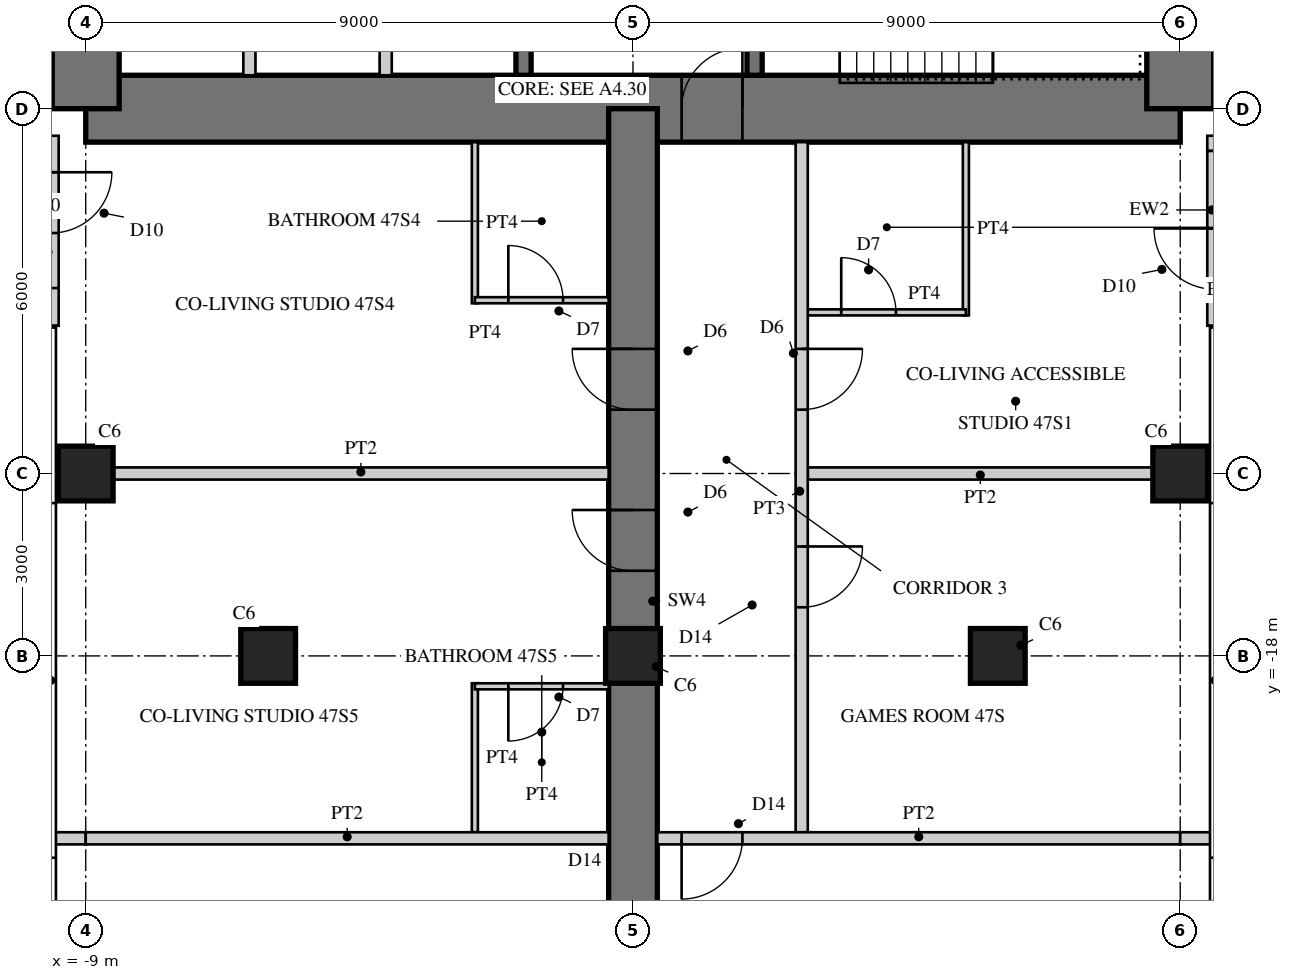
"""IFC4 building model, lengths in metres.
Left out: names, types, materials, properties, quantities, classifications, styles, units other than length and angle.
Written with IfcOpenShell. Run it as: python <this file> out.ifc"""

import sys

from ifc_helpers import new_model, si_unit, direction, frame, frame_2d, origin, origin_2d, place, context, subcontext, project, spatial, rectangle, hollow_rectangle, extrude, element, fill, save


model = new_model("IFC4")
c1 = context("Model", 3, precision=1e-05, world=origin(), true_north=direction((0.0, 1.0)))
c2 = subcontext(c1, "Body", "Model", "MODEL_VIEW")
j1 = project(units=[si_unit("LENGTHUNIT", "METRE"), si_unit("PLANEANGLEUNIT", "RADIAN")], contexts=[c1])
p1 = place(None, origin())
s1 = spatial("IfcSite", under=j1, at=p1, CompositionType="ELEMENT")
p2 = place(p1, origin())
s2 = spatial("IfcBuilding", under=s1, at=p2, CompositionType="ELEMENT")
p3 = place(p2, frame((0.0, 0.0, 189.9)))
s3 = spatial("IfcBuildingStorey", under=s2, at=p3, CompositionType="ELEMENT", Elevation=189.9)
p4 = place(p3, frame((-9.0, -9.0, 0.0), z_axis=(0.0, 0.0, 1.0), x_axis=(1.0, 0.0, 0.0)))
e1 = element("IfcWall", 1, at=p4, inside=s3, PredefinedType="SHEAR", context=c2, shape_type="SweptSolid", body=[
    extrude(rectangle(XDim=18.0, YDim=1.1, at=frame_2d((9.0, 0.0))), origin(), (0.0, 0.0, 1.0), 3.4),
])
p5 = place(p4, frame((9.8, 0.0, 0.0)))
e2 = element("IfcOpeningElement", 2, at=p5, cuts=e1, PredefinedType="OPENING", context=c2, shape_type="SweptSolid", body=[
    extrude(rectangle(XDim=1.0, YDim=2.4, at=frame_2d((0.5, 1.2))), frame((0.0, 0.56, 0.0), z_axis=(0.0, -1.0, 0.0), x_axis=(1.0, 0.0, 0.0)), (0.0, 0.0, 1.0), 1.12),
])
p6 = place(p3, frame((9.0, -9.0, 0.0), z_axis=(0.0, 0.0, 1.0), x_axis=(0.0, 1.0, 0.0)))
e3 = element("IfcWall", 3, at=p6, inside=s3, PredefinedType="SHEAR", context=c2, shape_type="SweptSolid", body=[
    extrude(rectangle(XDim=18.0, YDim=1.1, at=frame_2d((9.0, 0.0))), origin(), (0.0, 0.0, 1.0), 3.4),
])
p7 = place(p6, frame((9.8, 0.0, 0.0)))
e4 = element("IfcOpeningElement", 4, at=p7, cuts=e3, PredefinedType="OPENING", context=c2, shape_type="SweptSolid", body=[
    extrude(rectangle(XDim=1.0, YDim=2.4, at=frame_2d((0.5, 1.2))), frame((0.0, 0.56, 0.0), z_axis=(0.0, -1.0, 0.0), x_axis=(1.0, 0.0, 0.0)), (0.0, 0.0, 1.0), 1.12),
])
p8 = place(p3, frame((-9.0, 9.0, 0.0), z_axis=(0.0, 0.0, 1.0), x_axis=(0.0, -1.0, 0.0)))
e5 = element("IfcWall", 5, at=p8, inside=s3, PredefinedType="SHEAR", context=c2, shape_type="SweptSolid", body=[
    extrude(rectangle(XDim=18.0, YDim=1.1, at=frame_2d((9.0, 0.0))), origin(), (0.0, 0.0, 1.0), 3.4),
])
p9 = place(p8, frame((9.8, 0.0, 0.0)))
e6 = element("IfcOpeningElement", 6, at=p9, cuts=e5, PredefinedType="OPENING", context=c2, shape_type="SweptSolid", body=[
    extrude(rectangle(XDim=1.0, YDim=2.4, at=frame_2d((0.5, 1.2))), frame((0.0, 0.56, 0.0), z_axis=(0.0, -1.0, 0.0), x_axis=(1.0, 0.0, 0.0)), (0.0, 0.0, 1.0), 1.12),
])
p10 = place(p3, frame((-1.8, -1.875, 0.0), z_axis=(0.0, 0.0, 1.0), x_axis=(0.0, -1.0, 0.0)))
e7 = element("IfcWall", 7, at=p10, inside=s3, PredefinedType="SHEAR", context=c2, shape_type="SweptSolid", body=[
    extrude(rectangle(XDim=6.575, YDim=0.25, at=frame_2d((3.288, 0.0))), origin(), (0.0, 0.0, 1.0), 3.4),
])
p11 = place(p10, frame((1.875, 0.0, 0.0)))
e8 = element("IfcOpeningElement", 8, at=p11, cuts=e7, PredefinedType="OPENING", context=c2, shape_type="SweptSolid", body=[
    extrude(rectangle(XDim=1.6, YDim=2.4, at=frame_2d((0.8, 1.2))), frame((0.0, 0.135, 0.0), z_axis=(0.0, -1.0, 0.0), x_axis=(1.0, 0.0, 0.0)), (0.0, 0.0, 1.0), 0.27),
])
for number, where, z_axis, x_axis in (
    (9, (-4.067, -5.975, 0.0), (0.0, 0.0, 1.0), (0.0, -1.0, 0.0)),
    (10, (-6.308, -5.975, 0.0), (0.0, 0.0, 1.0), (0.0, -1.0, 0.0)),
):
    element("IfcWall", number, at=place(p3, frame(where, z_axis=z_axis, x_axis=x_axis)), inside=s3, PredefinedType="PARTITIONING", context=c2, shape_type="SweptSolid", body=[
        extrude(rectangle(XDim=2.475, YDim=0.2, at=frame_2d((1.237, 0.0))), origin(), (0.0, 0.0, 1.0), 3.4),
    ])
p12 = place(p3, frame((2.0, -1.675, 0.0), z_axis=(0.0, 0.0, 1.0), x_axis=(0.0, -1.0, 0.0)))
e11 = element("IfcWall", 11, at=p12, inside=s3, PredefinedType="SHEAR", context=c2, shape_type="SweptSolid", body=[
    extrude(rectangle(XDim=6.775, YDim=0.25, at=frame_2d((3.387, 0.0))), origin(), (0.0, 0.0, 1.0), 3.4),
])
p13 = place(p12, frame((0.725, 0.0, 0.0)))
e12 = element("IfcOpeningElement", 12, at=p13, cuts=e11, PredefinedType="OPENING", context=c2, shape_type="SweptSolid", body=[
    extrude(rectangle(XDim=1.0, YDim=2.1, at=frame_2d((0.5, 1.05))), frame((0.0, 0.135, 0.0), z_axis=(0.0, -1.0, 0.0), x_axis=(1.0, 0.0, 0.0)), (0.0, 0.0, 1.0), 0.27),
])
p14 = place(p3, frame((0.0, -9.0, 0.0), z_axis=(0.0, 0.0, 1.0), x_axis=(0.0, -1.0, 0.0)))
e13 = element("IfcWall", 13, at=p14, inside=s3, PredefinedType="SHEAR", context=c2, shape_type="SweptSolid", body=[
    extrude(rectangle(XDim=18.0, YDim=0.8, at=frame_2d((9.0, 0.0))), origin(), (0.0, 0.0, 1.0), 3.4),
])
p15 = place(p14, frame((3.95, 0.0, 0.0)))
e14 = element("IfcOpeningElement", 14, at=p15, cuts=e13, PredefinedType="OPENING", context=c2, shape_type="SweptSolid", body=[
    extrude(rectangle(XDim=1.0, YDim=2.15, at=frame_2d((0.5, 1.075))), frame((0.0, 0.41, 0.0), z_axis=(0.0, -1.0, 0.0), x_axis=(1.0, 0.0, 0.0)), (0.0, 0.0, 1.0), 0.82),
])
p16 = place(p14, frame((6.6, 0.0, 0.0)))
e15 = element("IfcOpeningElement", 15, at=p16, cuts=e13, PredefinedType="OPENING", context=c2, shape_type="SweptSolid", body=[
    extrude(rectangle(XDim=1.0, YDim=2.15, at=frame_2d((0.5, 1.075))), frame((0.0, 0.41, 0.0), z_axis=(0.0, -1.0, 0.0), x_axis=(1.0, 0.0, 0.0)), (0.0, 0.0, 1.0), 0.82),
])
p17 = place(p14, frame((13.25, 0.0, 0.0)))
e16 = element("IfcOpeningElement", 16, at=p17, cuts=e13, PredefinedType="OPENING", context=c2, shape_type="SweptSolid", body=[
    extrude(rectangle(XDim=1.0, YDim=2.2, at=frame_2d((0.5, 1.1))), frame((0.0, 0.41, 0.0), z_axis=(0.0, -1.0, 0.0), x_axis=(1.0, 0.0, 0.0)), (0.0, 0.0, 1.0), 0.82),
])
for number, where, z_axis, x_axis in (
    (17, (-9.0, -15.0, 0.0), (0.0, 0.0, 1.0), (1.0, 0.0, 0.0)),
    (18, (9.0, -15.0, 0.0), (0.0, 0.0, 1.0), (1.0, 0.0, 0.0)),
    (19, (-6.0, -18.0, 0.0), (0.0, 0.0, 1.0), (1.0, 0.0, 0.0)),
    (20, (0.0, -18.0, 0.0), (0.0, 0.0, 1.0), (1.0, 0.0, 0.0)),
    (21, (6.0, -18.0, 0.0), (0.0, 0.0, 1.0), (1.0, 0.0, 0.0)),
):
    element("IfcColumn", number, at=place(p3, frame(where, z_axis=z_axis, x_axis=x_axis)), inside=s3, PredefinedType="COLUMN", context=c2, shape_type="SweptSolid", body=[
        extrude(rectangle(XDim=0.9, YDim=0.9, at=origin_2d()), origin(), (0.0, 0.0, 1.0), 3.4),
    ])
p18 = place(p3, frame((9.445, -9.57, 0.0), z_axis=(0.0, 0.0, 1.0), x_axis=(1.0, 0.0, 0.0)))
e22 = element("IfcWall", 22, at=p18, inside=s3, PredefinedType="SOLIDWALL", context=c2, shape_type="SweptSolid", body=[
    extrude(rectangle(XDim=3.125, YDim=0.25, at=frame_2d((1.562, 0.0))), origin(), (0.0, 0.0, 1.0), 3.22),
])
p19 = place(p18, frame((0.6, 0.0, 0.0)))
e23 = element("IfcOpeningElement", 23, at=p19, cuts=e22, PredefinedType="OPENING", context=c2, shape_type="SweptSolid", body=[
    extrude(rectangle(XDim=1.0, YDim=2.2, at=frame_2d((0.5, 1.1))), frame((0.0, 0.135, 0.0), z_axis=(0.0, -1.0, 0.0), x_axis=(1.0, 0.0, 0.0)), (0.0, 0.0, 1.0), 0.27),
])
p20 = place(p3, frame((-9.57, -9.445, 0.0), z_axis=(0.0, 0.0, 1.0), x_axis=(0.0, -1.0, 0.0)))
e24 = element("IfcWall", 24, at=p20, inside=s3, PredefinedType="SOLIDWALL", context=c2, shape_type="SweptSolid", body=[
    extrude(rectangle(XDim=3.125, YDim=0.25, at=frame_2d((1.562, 0.0))), origin(), (0.0, 0.0, 1.0), 3.22),
])
p21 = place(p20, frame((0.6, 0.0, 0.0)))
e25 = element("IfcOpeningElement", 25, at=p21, cuts=e24, PredefinedType="OPENING", context=c2, shape_type="SweptSolid", body=[
    extrude(rectangle(XDim=1.0, YDim=2.2, at=frame_2d((0.5, 1.1))), frame((0.0, 0.135, 0.0), z_axis=(0.0, -1.0, 0.0), x_axis=(1.0, 0.0, 0.0)), (0.0, 0.0, 1.0), 0.27),
])
p22 = place(p3, frame((9.57, -12.57, 0.0), z_axis=(0.0, 0.0, 1.0), x_axis=(0.0, 1.0, 0.0)))
e26 = element("IfcWall", 26, at=p22, inside=s3, PredefinedType="SOLIDWALL", context=c2, shape_type="SweptSolid", body=[
    extrude(rectangle(XDim=2.875, YDim=0.25, at=frame_2d((1.438, 0.0))), origin(), (0.0, 0.0, 1.0), 3.22),
])
p23 = place(p22, frame((0.6, 0.0, 0.0)))
e27 = element("IfcOpeningElement", 27, at=p23, cuts=e26, PredefinedType="OPENING", context=c2, shape_type="SweptSolid", body=[
    extrude(rectangle(XDim=1.0, YDim=2.2, at=frame_2d((0.5, 1.1))), frame((0.0, 0.135, 0.0), z_axis=(0.0, -1.0, 0.0), x_axis=(1.0, 0.0, 0.0)), (0.0, 0.0, 1.0), 0.27),
])
p24 = place(p3, frame((5.475, -9.55, 0.0), z_axis=(0.0, 0.0, 1.0), x_axis=(0.0, -1.0, 0.0)))
e28 = element("IfcWall", 28, at=p24, inside=s3, PredefinedType="PARTITIONING", context=c2, shape_type="SweptSolid", body=[
    extrude(rectangle(XDim=2.85, YDim=0.1, at=frame_2d((1.425, 0.0))), origin(), (0.0, 0.0, 1.0), 3.22),
])
p25 = place(p3, frame((2.875, -12.35, 0.0), z_axis=(0.0, 0.0, 1.0), x_axis=(1.0, 0.0, 0.0)))
e29 = element("IfcWall", 29, at=p25, inside=s3, PredefinedType="PARTITIONING", context=c2, shape_type="SweptSolid", body=[
    extrude(rectangle(XDim=2.6, YDim=0.1, at=frame_2d((1.3, 0.0))), origin(), (0.0, 0.0, 1.0), 3.22),
])
p26 = place(p25, frame((0.55, 0.0, 0.0)))
e30 = element("IfcOpeningElement", 30, at=p26, cuts=e29, PredefinedType="OPENING", context=c2, shape_type="SweptSolid", body=[
    extrude(rectangle(XDim=0.9, YDim=2.1, at=frame_2d((0.45, 1.05))), frame((0.0, 0.06, 0.0), z_axis=(0.0, -1.0, 0.0), x_axis=(1.0, 0.0, 0.0)), (0.0, 0.0, 1.0), 0.12),
])
p27 = place(p3, frame((-2.6, -9.55, 0.0), z_axis=(0.0, 0.0, 1.0), x_axis=(0.0, -1.0, 0.0)))
e31 = element("IfcWall", 31, at=p27, inside=s3, PredefinedType="PARTITIONING", context=c2, shape_type="SweptSolid", body=[
    extrude(rectangle(XDim=2.65, YDim=0.1, at=frame_2d((1.325, 0.0))), origin(), (0.0, 0.0, 1.0), 3.22),
])
p28 = place(p3, frame((-2.6, -12.15, 0.0), z_axis=(0.0, 0.0, 1.0), x_axis=(1.0, 0.0, 0.0)))
e32 = element("IfcWall", 32, at=p28, inside=s3, PredefinedType="PARTITIONING", context=c2, shape_type="SweptSolid", body=[
    extrude(rectangle(XDim=2.2, YDim=0.1, at=frame_2d((1.1, 0.0))), origin(), (0.0, 0.0, 1.0), 3.22),
])
p29 = place(p28, frame((0.55, 0.0, 0.0)))
e33 = element("IfcOpeningElement", 33, at=p29, cuts=e32, PredefinedType="OPENING", context=c2, shape_type="SweptSolid", body=[
    extrude(rectangle(XDim=0.9, YDim=2.1, at=frame_2d((0.45, 1.05))), frame((0.0, 0.06, 0.0), z_axis=(0.0, -1.0, 0.0), x_axis=(1.0, 0.0, 0.0)), (0.0, 0.0, 1.0), 0.12),
])
p30 = place(p3, frame((2.875, -15.0, 0.0), z_axis=(0.0, 0.0, 1.0), x_axis=(1.0, 0.0, 0.0)))
e34 = element("IfcWall", 34, at=p30, inside=s3, PredefinedType="SOLIDWALL", context=c2, shape_type="SweptSolid", body=[
    extrude(rectangle(XDim=5.675, YDim=0.2, at=frame_2d((2.837, 0.0))), origin(), (0.0, 0.0, 1.0), 2.47),
])
p31 = place(p3, frame((-8.55, -15.0, 0.0), z_axis=(0.0, 0.0, 1.0), x_axis=(1.0, 0.0, 0.0)))
e35 = element("IfcWall", 35, at=p31, inside=s3, PredefinedType="SOLIDWALL", context=c2, shape_type="SweptSolid", body=[
    extrude(rectangle(XDim=8.15, YDim=0.2, at=frame_2d((4.075, 0.0))), origin(), (0.0, 0.0, 1.0), 2.47),
])
p32 = place(p3, frame((-2.6, -18.45, 0.0), z_axis=(0.0, 0.0, 1.0), x_axis=(0.0, -1.0, 0.0)))
e36 = element("IfcWall", 36, at=p32, inside=s3, PredefinedType="PARTITIONING", context=c2, shape_type="SweptSolid", body=[
    extrude(rectangle(XDim=2.45, YDim=0.1, at=frame_2d((1.225, 0.0))), origin(), (0.0, 0.0, 1.0), 3.22),
])
p33 = place(p3, frame((-2.6, -18.5, 0.0), z_axis=(0.0, 0.0, 1.0), x_axis=(1.0, 0.0, 0.0)))
e37 = element("IfcWall", 37, at=p33, inside=s3, PredefinedType="PARTITIONING", context=c2, shape_type="SweptSolid", body=[
    extrude(rectangle(XDim=2.2, YDim=0.1, at=frame_2d((1.1, 0.0))), origin(), (0.0, 0.0, 1.0), 3.22),
])
p34 = place(p33, frame((0.55, 0.0, 0.0)))
e38 = element("IfcOpeningElement", 38, at=p34, cuts=e37, PredefinedType="OPENING", context=c2, shape_type="SweptSolid", body=[
    extrude(rectangle(XDim=0.9, YDim=2.1, at=frame_2d((0.45, 1.05))), frame((0.0, 0.06, 0.0), z_axis=(0.0, -1.0, 0.0), x_axis=(1.0, 0.0, 0.0)), (0.0, 0.0, 1.0), 0.12),
])
p35 = place(p3, frame((2.775, -9.55, 0.0), z_axis=(0.0, 0.0, 1.0), x_axis=(0.0, -1.0, 0.0)))
e39 = element("IfcWall", 39, at=p35, inside=s3, PredefinedType="SOLIDWALL", context=c2, shape_type="SweptSolid", body=[
    extrude(rectangle(XDim=11.45, YDim=0.2, at=frame_2d((5.725, 0.0))), origin(), (0.0, 0.0, 1.0), 3.22),
])
p36 = place(p35, frame((3.4, 0.0, 0.0)))
e40 = element("IfcOpeningElement", 40, at=p36, cuts=e39, PredefinedType="OPENING", context=c2, shape_type="SweptSolid", body=[
    extrude(rectangle(XDim=1.0, YDim=2.15, at=frame_2d((0.5, 1.075))), frame((0.0, 0.11, 0.0), z_axis=(0.0, -1.0, 0.0), x_axis=(1.0, 0.0, 0.0)), (0.0, 0.0, 1.0), 0.22),
])
p37 = place(p35, frame((6.65, 0.0, 0.0)))
e41 = element("IfcOpeningElement", 41, at=p37, cuts=e39, PredefinedType="OPENING", context=c2, shape_type="SweptSolid", body=[
    extrude(rectangle(XDim=1.0, YDim=2.2, at=frame_2d((0.5, 1.1))), frame((0.0, 0.11, 0.0), z_axis=(0.0, -1.0, 0.0), x_axis=(1.0, 0.0, 0.0)), (0.0, 0.0, 1.0), 0.22),
])
p38 = place(p3, frame((-9.53, -21.0, 0.0), z_axis=(0.0, 0.0, 1.0), x_axis=(1.0, 0.0, 0.0)))
e42 = element("IfcWall", 42, at=p38, inside=s3, PredefinedType="SOLIDWALL", context=c2, shape_type="SweptSolid", body=[
    extrude(rectangle(XDim=0.53, YDim=0.2, at=frame_2d((0.265, 0.0))), origin(), (0.0, 0.0, 1.0), 3.22),
])
p39 = place(p3, frame((-9.0, -21.0, 0.0), z_axis=(0.0, 0.0, 1.0), x_axis=(1.0, 0.0, 0.0)))
e43 = element("IfcWall", 43, at=p39, inside=s3, PredefinedType="SOLIDWALL", context=c2, shape_type="SweptSolid", body=[
    extrude(rectangle(XDim=8.6, YDim=0.2, at=frame_2d((4.3, 0.0))), origin(), (0.0, 0.0, 1.0), 2.62),
])
p40 = place(p3, frame((0.4, -21.0, 0.0), z_axis=(0.0, 0.0, 1.0), x_axis=(1.0, 0.0, 0.0)))
e44 = element("IfcWall", 44, at=p40, inside=s3, PredefinedType="SOLIDWALL", context=c2, shape_type="SweptSolid", body=[
    extrude(rectangle(XDim=8.6, YDim=0.2, at=frame_2d((4.3, 0.0))), origin(), (0.0, 0.0, 1.0), 2.62),
])
p41 = place(p40, frame((0.4, 0.0, 0.0)))
e45 = element("IfcOpeningElement", 45, at=p41, cuts=e44, PredefinedType="OPENING", context=c2, shape_type="SweptSolid", body=[
    extrude(rectangle(XDim=1.0, YDim=2.2, at=frame_2d((0.5, 1.1))), frame((0.0, 0.11, 0.0), z_axis=(0.0, -1.0, 0.0), x_axis=(1.0, 0.0, 0.0)), (0.0, 0.0, 1.0), 0.22),
])
p42 = place(p3, frame((9.0, -21.0, 0.0), z_axis=(0.0, 0.0, 1.0), x_axis=(1.0, 0.0, 0.0)))
e46 = element("IfcWall", 46, at=p42, inside=s3, PredefinedType="SOLIDWALL", context=c2, shape_type="SweptSolid", body=[
    extrude(rectangle(XDim=0.53, YDim=0.2, at=frame_2d((0.265, 0.0))), origin(), (0.0, 0.0, 1.0), 3.22),
])
p43 = place(p21, origin())
e47 = element("IfcDoor", 47, at=p43, inside=s3, OperationType="SINGLE_SWING_LEFT", PredefinedType="DOOR", context=c2, shape_type="SweptSolid", body=[
    extrude(hollow_rectangle(XDim=1.0, YDim=2.2, WallThickness=0.06, at=frame_2d((0.5, 1.1))), frame((0.0, 0.025, 0.0), z_axis=(0.0, -1.0, 0.0), x_axis=(1.0, 0.0, 0.0)), (0.0, 0.0, 1.0), 0.05),
    extrude(rectangle(XDim=0.879, YDim=2.079, at=frame_2d((0.5, 1.1))), frame((0.0, 0.025, 0.0), z_axis=(0.0, -1.0, 0.0), x_axis=(1.0, 0.0, 0.0)), (0.0, 0.0, 1.0), 0.05),
])
fill(e25, e47)
p44 = place(p23, origin())
e48 = element("IfcDoor", 48, at=p44, inside=s3, OperationType="SINGLE_SWING_RIGHT", PredefinedType="DOOR", context=c2, shape_type="SweptSolid", body=[
    extrude(hollow_rectangle(XDim=1.0, YDim=2.2, WallThickness=0.06, at=frame_2d((0.5, 1.1))), frame((0.0, 0.025, 0.0), z_axis=(0.0, -1.0, 0.0), x_axis=(1.0, 0.0, 0.0)), (0.0, 0.0, 1.0), 0.05),
    extrude(rectangle(XDim=0.879, YDim=2.079, at=frame_2d((0.5, 1.1))), frame((0.0, 0.025, 0.0), z_axis=(0.0, -1.0, 0.0), x_axis=(1.0, 0.0, 0.0)), (0.0, 0.0, 1.0), 0.05),
])
fill(e27, e48)
p45 = place(p26, origin())
e49 = element("IfcDoor", 49, at=p45, inside=s3, OperationType="SINGLE_SWING_LEFT", PredefinedType="DOOR", context=c2, shape_type="SweptSolid", body=[
    extrude(rectangle(XDim=0.9, YDim=2.1, at=frame_2d((0.45, 1.05))), frame((0.0, 0.025, 0.0), z_axis=(0.0, -1.0, 0.0), x_axis=(1.0, 0.0, 0.0)), (0.0, 0.0, 1.0), 0.05),
])
fill(e30, e49)
p46 = place(p29, origin())
e50 = element("IfcDoor", 50, at=p46, inside=s3, OperationType="SINGLE_SWING_LEFT", PredefinedType="DOOR", context=c2, shape_type="SweptSolid", body=[
    extrude(rectangle(XDim=0.9, YDim=2.1, at=frame_2d((0.45, 1.05))), frame((0.0, 0.025, 0.0), z_axis=(0.0, -1.0, 0.0), x_axis=(1.0, 0.0, 0.0)), (0.0, 0.0, 1.0), 0.05),
])
fill(e33, e50)
p47 = place(p34, frame((0.9, 0.0, 0.0), z_axis=(0.0, 0.0, 1.0), x_axis=(-1.0, 0.0, 0.0)))
e51 = element("IfcDoor", 51, at=p47, inside=s3, OperationType="SINGLE_SWING_RIGHT", PredefinedType="DOOR", context=c2, shape_type="SweptSolid", body=[
    extrude(rectangle(XDim=0.9, YDim=2.1, at=frame_2d((0.45, 1.05))), frame((0.0, 0.025, 0.0), z_axis=(0.0, -1.0, 0.0), x_axis=(1.0, 0.0, 0.0)), (0.0, 0.0, 1.0), 0.05),
])
fill(e38, e51)
p48 = place(p36, origin())
e52 = element("IfcDoor", 52, at=p48, inside=s3, OperationType="SINGLE_SWING_LEFT", PredefinedType="DOOR", context=c2, shape_type="SweptSolid", body=[
    extrude(rectangle(XDim=1.0, YDim=2.15, at=frame_2d((0.5, 1.075))), frame((0.0, 0.025, 0.0), z_axis=(0.0, -1.0, 0.0), x_axis=(1.0, 0.0, 0.0)), (0.0, 0.0, 1.0), 0.05),
])
fill(e40, e52)
p49 = place(p37, origin())
e53 = element("IfcDoor", 53, at=p49, inside=s3, OperationType="SINGLE_SWING_LEFT", PredefinedType="DOOR", context=c2, shape_type="SweptSolid", body=[
    extrude(rectangle(XDim=1.0, YDim=2.2, at=frame_2d((0.5, 1.1))), frame((0.0, 0.025, 0.0), z_axis=(0.0, -1.0, 0.0), x_axis=(1.0, 0.0, 0.0)), (0.0, 0.0, 1.0), 0.05),
])
fill(e41, e53)
p50 = place(p41, frame((1.0, 0.0, 0.0), z_axis=(0.0, 0.0, 1.0), x_axis=(-1.0, 0.0, 0.0)))
e54 = element("IfcDoor", 54, at=p50, inside=s3, OperationType="SINGLE_SWING_RIGHT", PredefinedType="DOOR", context=c2, shape_type="SweptSolid", body=[
    extrude(rectangle(XDim=1.0, YDim=2.2, at=frame_2d((0.5, 1.1))), frame((0.0, 0.025, 0.0), z_axis=(0.0, -1.0, 0.0), x_axis=(1.0, 0.0, 0.0)), (0.0, 0.0, 1.0), 0.05),
])
fill(e45, e54)
p51 = place(p15, frame((1.0, 0.0, 0.0), z_axis=(0.0, 0.0, 1.0), x_axis=(-1.0, 0.0, 0.0)))
e55 = element("IfcDoor", 55, at=p51, inside=s3, OperationType="SINGLE_SWING_RIGHT", PredefinedType="DOOR", context=c2, shape_type="SweptSolid", body=[
    extrude(rectangle(XDim=1.0, YDim=2.15, at=frame_2d((0.5, 1.075))), frame((0.0, 0.025, 0.0), z_axis=(0.0, -1.0, 0.0), x_axis=(1.0, 0.0, 0.0)), (0.0, 0.0, 1.0), 0.05),
])
fill(e14, e55)
p52 = place(p16, frame((1.0, 0.0, 0.0), z_axis=(0.0, 0.0, 1.0), x_axis=(-1.0, 0.0, 0.0)))
e56 = element("IfcDoor", 56, at=p52, inside=s3, OperationType="SINGLE_SWING_RIGHT", PredefinedType="DOOR", context=c2, shape_type="SweptSolid", body=[
    extrude(rectangle(XDim=1.0, YDim=2.15, at=frame_2d((0.5, 1.075))), frame((0.0, 0.025, 0.0), z_axis=(0.0, -1.0, 0.0), x_axis=(1.0, 0.0, 0.0)), (0.0, 0.0, 1.0), 0.05),
])
fill(e15, e56)
p53 = place(p5, origin())
e57 = element("IfcDoor", 57, at=p53, inside=s3, OperationType="SINGLE_SWING_RIGHT", PredefinedType="DOOR", context=c2, shape_type="SweptSolid", body=[
    extrude(rectangle(XDim=1.0, YDim=2.4, at=frame_2d((0.5, 1.2))), frame((0.0, 0.055, 0.0), z_axis=(0.0, -1.0, 0.0), x_axis=(1.0, 0.0, 0.0)), (0.0, 0.0, 1.0), 0.05),
])
fill(e2, e57)
save(model, sys.argv[1])
